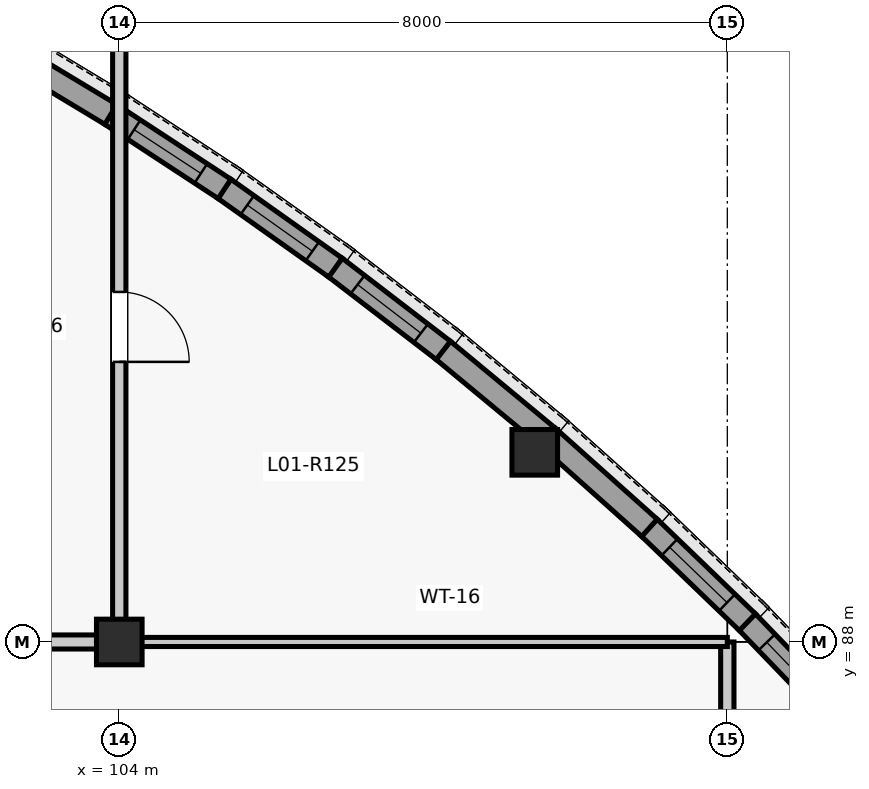
"""IFC4 building model, lengths in metres.
Left out: names, types, materials, properties, quantities, classifications, styles, units other than length and angle.
Written with IfcOpenShell. Run it as: python <this file> out.ifc"""

import sys

from ifc_helpers import new_model, si_unit, direction, frame, frame_2d, origin, origin_2d, place, context, subcontext, project, spatial, rectangle, extrude, element, fill, save


model = new_model("IFC4")
c1 = context("Model", 3, precision=1e-05, world=origin(), true_north=direction((0.0, 1.0)))
c2 = subcontext(c1, "Body", "Model", "MODEL_VIEW")
j1 = project(units=[si_unit("LENGTHUNIT", "METRE"), si_unit("PLANEANGLEUNIT", "RADIAN")], contexts=[c1])
p1 = place(None, origin())
s1 = spatial("IfcSite", under=j1, at=p1, CompositionType="ELEMENT")
p2 = place(p1, origin())
s2 = spatial("IfcBuilding", under=s1, at=p2, CompositionType="ELEMENT")
p3 = place(p2, frame((0.0, 0.0, 5.28)))
s3 = spatial("IfcBuildingStorey", under=s2, at=p3, CompositionType="ELEMENT", Elevation=5.28)
for number, where, z_axis, x_axis in (
    (1, (104.0, 88.0, 0.0), (0.0, 0.0, 1.0), (1.0, 0.0, 0.0)),
    (2, (109.467, 90.495, 0.0), (0.0, 0.0, 1.0), (1.0, 0.0, 0.0)),
):
    element("IfcColumn", number, at=place(p3, frame(where, z_axis=z_axis, x_axis=x_axis)), inside=s3, PredefinedType="COLUMN", context=c2, shape_type="SweptSolid", body=[
        extrude(rectangle(XDim=0.6, YDim=0.6, at=origin_2d()), origin(), (0.0, 0.0, 1.0), 4.62),
    ])
p4 = place(p3, frame((113.506, 86.971, 0.0), z_axis=(0.0, 0.0, 1.0), x_axis=(-0.693722700342, 0.720242191926, 0.0)))
e3 = element("IfcWall", 3, at=p4, inside=s3, PredefinedType="SOLIDWALL", context=c2, shape_type="SweptSolid", body=[
    extrude(rectangle(XDim=1.795, YDim=0.305, at=frame_2d((0.897, 0.0))), origin(), (0.0, 0.0, 1.0), 4.335),
])
p5 = place(p4, frame((0.373, 0.0, 0.9)))
e4 = element("IfcOpeningElement", 4, at=p5, cuts=e3, PredefinedType="OPENING", context=c2, shape_type="SweptSolid", body=[
    extrude(rectangle(XDim=1.05, YDim=1.85, at=frame_2d((0.525, 0.925))), frame((0.0, 0.162, 0.0), z_axis=(0.0, -1.0, 0.0), x_axis=(1.0, 0.0, 0.0)), (0.0, 0.0, 1.0), 0.325),
])
p6 = place(p3, frame((112.264, 88.26, 0.0), z_axis=(0.0, 0.0, 1.0), x_axis=(-0.720242191926, 0.693722700342, 0.0)))
e5 = element("IfcWall", 5, at=p6, inside=s3, PredefinedType="SOLIDWALL", context=c2, shape_type="SweptSolid", body=[
    extrude(rectangle(XDim=1.795, YDim=0.305, at=frame_2d((0.897, 0.0))), origin(), (0.0, 0.0, 1.0), 4.335),
])
p7 = place(p6, frame((0.373, 0.0, 0.9)))
e6 = element("IfcOpeningElement", 6, at=p7, cuts=e5, PredefinedType="OPENING", context=c2, shape_type="SweptSolid", body=[
    extrude(rectangle(XDim=1.05, YDim=1.85, at=frame_2d((0.525, 0.925))), frame((0.0, 0.162, 0.0), z_axis=(0.0, -1.0, 0.0), x_axis=(1.0, 0.0, 0.0)), (0.0, 0.0, 1.0), 0.325),
])
p8 = place(p3, frame((110.976, 89.502, 0.0), z_axis=(0.0, 0.0, 1.0), x_axis=(-0.745703543965, 0.666277888361, 0.0)))
e7 = element("IfcWall", 7, at=p8, inside=s3, PredefinedType="SOLIDWALL", context=c2, shape_type="SweptSolid", body=[
    extrude(rectangle(XDim=1.795, YDim=0.305, at=frame_2d((0.897, 0.0))), origin(), (0.0, 0.0, 1.0), 4.335),
])
p9 = place(p3, frame((109.642, 90.694, 0.0), z_axis=(0.0, 0.0, 1.0), x_axis=(-0.769991012207, 0.638054732073, 0.0)))
e8 = element("IfcWall", 8, at=p9, inside=s3, PredefinedType="SOLIDWALL", context=c2, shape_type="SweptSolid", body=[
    extrude(rectangle(XDim=1.795, YDim=0.305, at=frame_2d((0.897, 0.0))), origin(), (0.0, 0.0, 1.0), 4.335),
])
p10 = place(p3, frame((108.264, 91.836, 0.0), z_axis=(0.0, 0.0, 1.0), x_axis=(-0.793341406114, 0.608776981616, 0.0)))
e9 = element("IfcWall", 9, at=p10, inside=s3, PredefinedType="SOLIDWALL", context=c2, shape_type="SweptSolid", body=[
    extrude(rectangle(XDim=1.795, YDim=0.305, at=frame_2d((0.897, 0.0))), origin(), (0.0, 0.0, 1.0), 4.335),
])
p11 = place(p10, frame((0.373, 0.0, 0.9)))
e10 = element("IfcOpeningElement", 10, at=p11, cuts=e9, PredefinedType="OPENING", context=c2, shape_type="SweptSolid", body=[
    extrude(rectangle(XDim=1.05, YDim=1.85, at=frame_2d((0.525, 0.925))), frame((0.0, 0.162, 0.0), z_axis=(0.0, -1.0, 0.0), x_axis=(1.0, 0.0, 0.0)), (0.0, 0.0, 1.0), 0.325),
])
p12 = place(p3, frame((106.844, 92.925, 0.0), z_axis=(0.0, 0.0, 1.0), x_axis=(-0.815567185578, 0.578662393636, 0.0)))
e11 = element("IfcWall", 11, at=p12, inside=s3, PredefinedType="SOLIDWALL", context=c2, shape_type="SweptSolid", body=[
    extrude(rectangle(XDim=1.795, YDim=0.305, at=frame_2d((0.897, 0.0))), origin(), (0.0, 0.0, 1.0), 4.335),
])
p13 = place(p12, frame((0.373, 0.0, 0.9)))
e12 = element("IfcOpeningElement", 12, at=p13, cuts=e11, PredefinedType="OPENING", context=c2, shape_type="SweptSolid", body=[
    extrude(rectangle(XDim=1.05, YDim=1.85, at=frame_2d((0.525, 0.925))), frame((0.0, 0.162, 0.0), z_axis=(0.0, -1.0, 0.0), x_axis=(1.0, 0.0, 0.0)), (0.0, 0.0, 1.0), 0.325),
])
p14 = place(p3, frame((105.385, 93.961, 0.0), z_axis=(0.0, 0.0, 1.0), x_axis=(-0.836686786408, 0.547681678944, 0.0)))
e13 = element("IfcWall", 13, at=p14, inside=s3, PredefinedType="SOLIDWALL", context=c2, shape_type="SweptSolid", body=[
    extrude(rectangle(XDim=1.795, YDim=0.305, at=frame_2d((0.897, 0.0))), origin(), (0.0, 0.0, 1.0), 4.335),
])
p15 = place(p14, frame((0.373, 0.0, 0.9)))
e14 = element("IfcOpeningElement", 14, at=p15, cuts=e13, PredefinedType="OPENING", context=c2, shape_type="SweptSolid", body=[
    extrude(rectangle(XDim=1.05, YDim=1.85, at=frame_2d((0.525, 0.925))), frame((0.0, 0.162, 0.0), z_axis=(0.0, -1.0, 0.0), x_axis=(1.0, 0.0, 0.0)), (0.0, 0.0, 1.0), 0.325),
])
p16 = place(p3, frame((103.888, 94.941, 0.0), z_axis=(0.0, 0.0, 1.0), x_axis=(-0.856543302071, 0.51607516088, 0.0)))
e15 = element("IfcWall", 15, at=p16, inside=s3, PredefinedType="SOLIDWALL", context=c2, shape_type="SweptSolid", body=[
    extrude(rectangle(XDim=1.795, YDim=0.305, at=frame_2d((0.897, 0.0))), origin(), (0.0, 0.0, 1.0), 4.335),
])
p17 = place(p3, frame((96.29, 88.0, 0.0), z_axis=(0.0, 0.0, 1.0), x_axis=(1.0, 0.0, 0.0)))
e16 = element("IfcWall", 16, at=p17, inside=s3, PredefinedType="PARTITIONING", context=c2, shape_type="SweptSolid", body=[
    extrude(rectangle(XDim=7.42, YDim=0.185, at=frame_2d((3.71, 0.0))), origin(), (0.0, 0.0, 1.0), 3.826),
])
p18 = place(p17, frame((2.91, 0.0, 0.0)))
e17 = element("IfcOpeningElement", 17, at=p18, cuts=e16, PredefinedType="OPENING", context=c2, shape_type="SweptSolid", body=[
    extrude(rectangle(XDim=1.6, YDim=2.25, at=frame_2d((0.8, 1.125))), frame((0.0, 0.103, 0.0), z_axis=(0.0, -1.0, 0.0), x_axis=(1.0, 0.0, 0.0)), (0.0, 0.0, 1.0), 0.205),
])
p19 = place(p3, frame((104.0, 88.29, 0.0), z_axis=(0.0, 0.0, 1.0), x_axis=(0.0, 1.0, 0.0)))
e18 = element("IfcWall", 18, at=p19, inside=s3, PredefinedType="PARTITIONING", context=c2, shape_type="SweptSolid", body=[
    extrude(rectangle(XDim=7.71, YDim=0.175, at=frame_2d((3.855, 0.0))), origin(), (0.0, 0.0, 1.0), 4.325),
])
p20 = place(p19, frame((3.395, 0.0, 0.0)))
e19 = element("IfcOpeningElement", 19, at=p20, cuts=e18, PredefinedType="OPENING", context=c2, shape_type="SweptSolid", body=[
    extrude(rectangle(XDim=0.92, YDim=2.1, at=frame_2d((0.46, 1.05))), frame((0.0, 0.097, 0.0), z_axis=(0.0, -1.0, 0.0), x_axis=(1.0, 0.0, 0.0)), (0.0, 0.0, 1.0), 0.195),
])
p21 = place(p3, frame((112.0, 80.29, 0.0), z_axis=(0.0, 0.0, 1.0), x_axis=(0.0, 1.0, 0.0)))
e20 = element("IfcWall", 20, at=p21, inside=s3, PredefinedType="PARTITIONING", context=c2, shape_type="SweptSolid", body=[
    extrude(rectangle(XDim=7.71, YDim=0.175, at=frame_2d((3.855, 0.0))), origin(), (0.0, 0.0, 1.0), 4.325),
])
p22 = place(p21, frame((2.955, 0.0, 0.0)))
e21 = element("IfcOpeningElement", 21, at=p22, cuts=e20, PredefinedType="OPENING", context=c2, shape_type="SweptSolid", body=[
    extrude(rectangle(XDim=1.8, YDim=2.35, at=frame_2d((0.9, 1.175))), frame((0.0, 0.097, 0.0), z_axis=(0.0, -1.0, 0.0), x_axis=(1.0, 0.0, 0.0)), (0.0, 0.0, 1.0), 0.195),
])
p23 = place(p3, frame((104.29, 88.0, 0.0), z_axis=(0.0, 0.0, 1.0), x_axis=(1.0, 0.0, 0.0)))
e22 = element("IfcWall", 22, at=p23, inside=s3, PredefinedType="PARTITIONING", context=c2, shape_type="SweptSolid", body=[
    extrude(rectangle(XDim=7.71, YDim=0.12, at=frame_2d((3.855, 0.0))), origin(), (0.0, 0.0, 1.0), 4.325),
])
p24 = place(p5, origin())
e23 = element("IfcWindow", 23, at=p24, inside=s3, PartitioningType="SINGLE_PANEL", PredefinedType="WINDOW", context=c2, shape_type="SweptSolid", body=[
    extrude(rectangle(XDim=1.05, YDim=1.85, at=frame_2d((0.525, 0.925))), frame((0.0, 0.03, 0.0), z_axis=(0.0, -1.0, 0.0), x_axis=(1.0, 0.0, 0.0)), (0.0, 0.0, 1.0), 0.06),
])
fill(e4, e23)
p25 = place(p7, origin())
e24 = element("IfcWindow", 24, at=p25, inside=s3, PartitioningType="SINGLE_PANEL", PredefinedType="WINDOW", context=c2, shape_type="SweptSolid", body=[
    extrude(rectangle(XDim=1.05, YDim=1.85, at=frame_2d((0.525, 0.925))), frame((0.0, 0.03, 0.0), z_axis=(0.0, -1.0, 0.0), x_axis=(1.0, 0.0, 0.0)), (0.0, 0.0, 1.0), 0.06),
])
fill(e6, e24)
p26 = place(p11, origin())
e25 = element("IfcWindow", 25, at=p26, inside=s3, PartitioningType="SINGLE_PANEL", PredefinedType="WINDOW", context=c2, shape_type="SweptSolid", body=[
    extrude(rectangle(XDim=1.05, YDim=1.85, at=frame_2d((0.525, 0.925))), frame((0.0, 0.03, 0.0), z_axis=(0.0, -1.0, 0.0), x_axis=(1.0, 0.0, 0.0)), (0.0, 0.0, 1.0), 0.06),
])
fill(e10, e25)
p27 = place(p13, origin())
e26 = element("IfcWindow", 26, at=p27, inside=s3, PartitioningType="SINGLE_PANEL", PredefinedType="WINDOW", context=c2, shape_type="SweptSolid", body=[
    extrude(rectangle(XDim=1.05, YDim=1.85, at=frame_2d((0.525, 0.925))), frame((0.0, 0.03, 0.0), z_axis=(0.0, -1.0, 0.0), x_axis=(1.0, 0.0, 0.0)), (0.0, 0.0, 1.0), 0.06),
])
fill(e12, e26)
p28 = place(p15, origin())
e27 = element("IfcWindow", 27, at=p28, inside=s3, PartitioningType="SINGLE_PANEL", PredefinedType="WINDOW", context=c2, shape_type="SweptSolid", body=[
    extrude(rectangle(XDim=1.05, YDim=1.85, at=frame_2d((0.525, 0.925))), frame((0.0, 0.03, 0.0), z_axis=(0.0, -1.0, 0.0), x_axis=(1.0, 0.0, 0.0)), (0.0, 0.0, 1.0), 0.06),
])
fill(e14, e27)
p29 = place(p20, frame((0.92, 0.0, 0.0), z_axis=(0.0, 0.0, 1.0), x_axis=(-1.0, 0.0, 0.0)))
e28 = element("IfcDoor", 28, at=p29, inside=s3, OperationType="SINGLE_SWING_LEFT", PredefinedType="DOOR", context=c2, shape_type="SweptSolid", body=[
    extrude(rectangle(XDim=0.92, YDim=2.1, at=frame_2d((0.46, 1.05))), frame((0.0, 0.025, 0.0), z_axis=(0.0, -1.0, 0.0), x_axis=(1.0, 0.0, 0.0)), (0.0, 0.0, 1.0), 0.05),
])
fill(e19, e28)
save(model, sys.argv[1])
